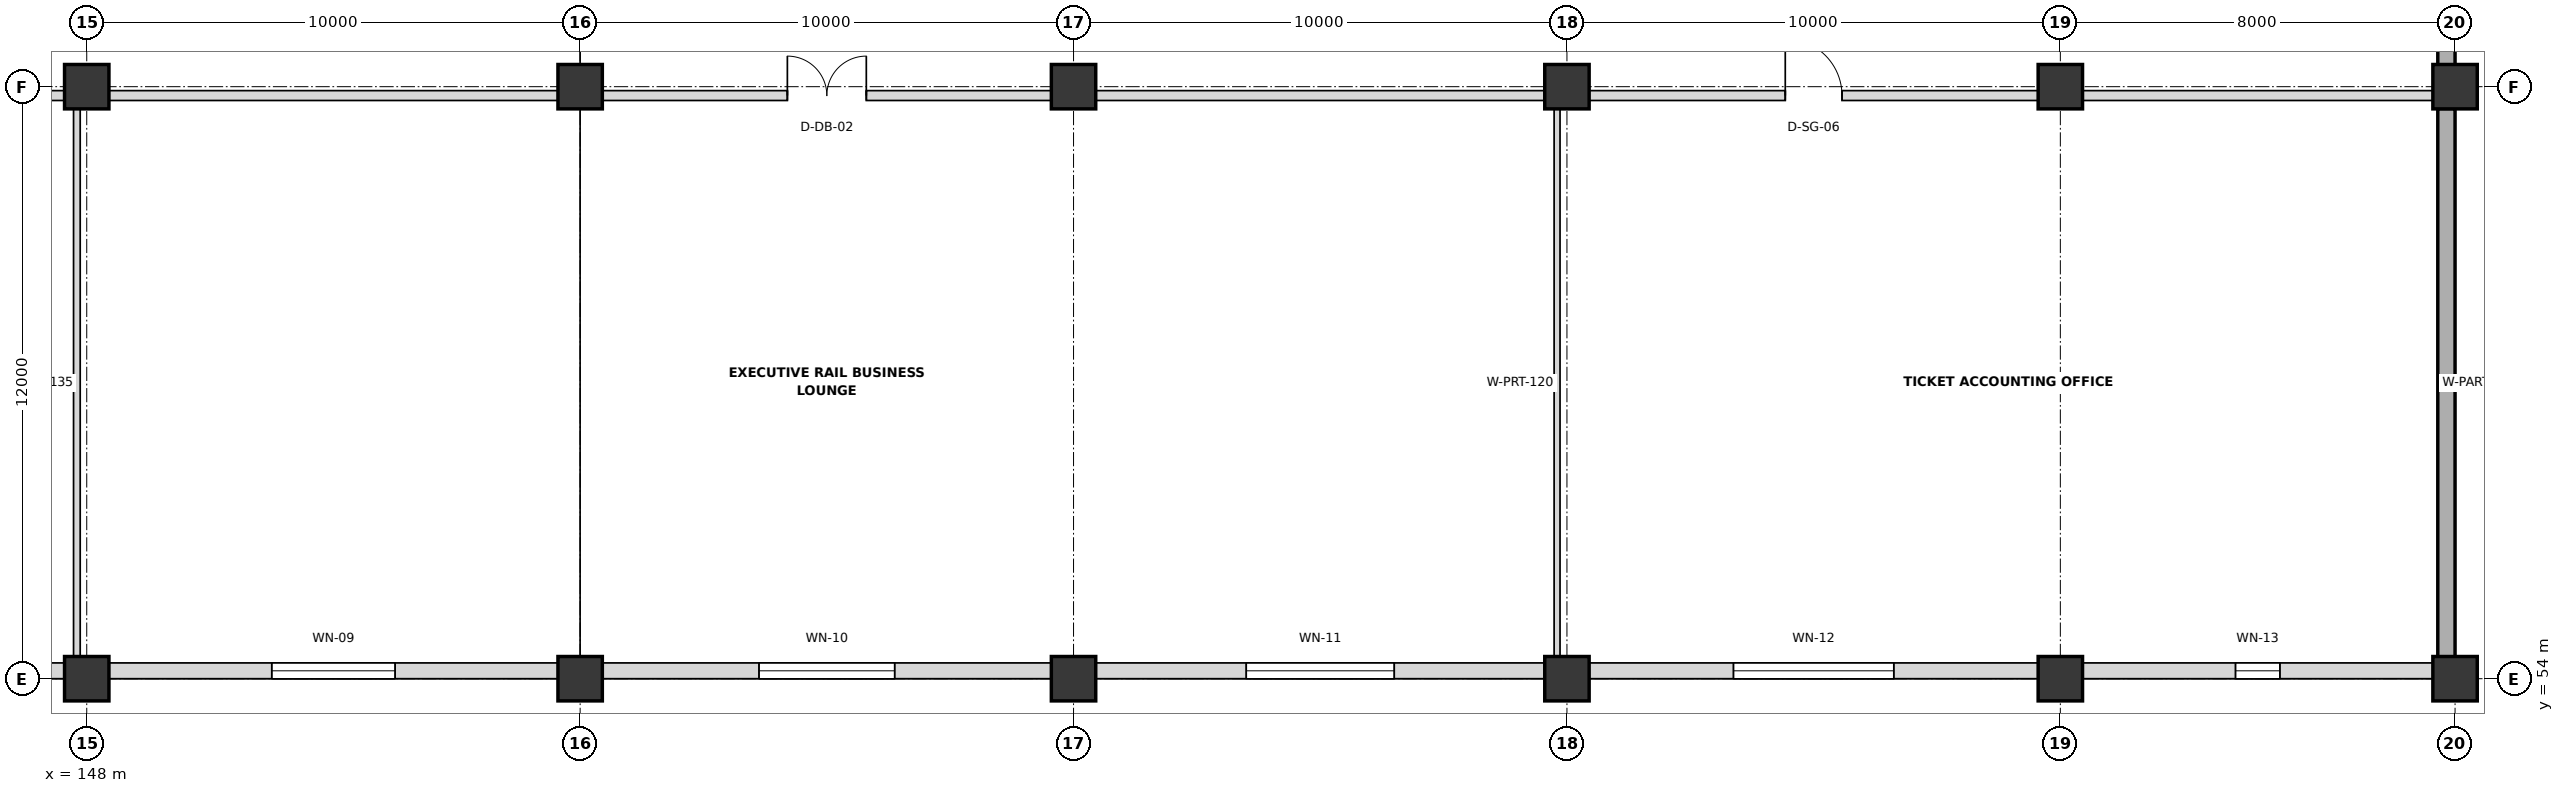
"""IFC4 building model, lengths in metres.
Left out: names, types, materials, properties, quantities, classifications, styles, units other than length and angle.
Written with IfcOpenShell. Run it as: python <this file> out.ifc"""

import sys

from ifc_helpers import new_model, si_unit, direction, frame, frame_2d, origin, origin_2d, place, context, subcontext, project, spatial, rectangle, extrude, element, fill, save


model = new_model("IFC4")
c1 = context("Model", 3, precision=1e-05, world=origin(), true_north=direction((0.0, 1.0)))
c2 = subcontext(c1, "Body", "Model", "MODEL_VIEW")
j1 = project(units=[si_unit("LENGTHUNIT", "METRE"), si_unit("PLANEANGLEUNIT", "RADIAN")], contexts=[c1])
p1 = place(None, origin())
s1 = spatial("IfcSite", under=j1, at=p1, CompositionType="ELEMENT")
p2 = place(p1, origin())
s2 = spatial("IfcBuilding", under=s1, at=p2, CompositionType="ELEMENT")
p3 = place(p2, frame((0.0, 0.0, 5.4)))
s3 = spatial("IfcBuildingStorey", under=s2, at=p3, CompositionType="ELEMENT", Elevation=5.4)
for number, where, z_axis, x_axis in (
    (1, (148.0, 54.0, 0.0), (0.0, 0.0, 1.0), (1.0, 0.0, 0.0)),
    (2, (148.0, 66.0, 0.0), (0.0, 0.0, 1.0), (1.0, 0.0, 0.0)),
    (3, (158.0, 54.0, 0.0), (0.0, 0.0, 1.0), (1.0, 0.0, 0.0)),
    (4, (158.0, 66.0, 0.0), (0.0, 0.0, 1.0), (1.0, 0.0, 0.0)),
    (5, (168.0, 54.0, 0.0), (0.0, 0.0, 1.0), (1.0, 0.0, 0.0)),
    (6, (168.0, 66.0, 0.0), (0.0, 0.0, 1.0), (1.0, 0.0, 0.0)),
    (7, (178.0, 54.0, 0.0), (0.0, 0.0, 1.0), (1.0, 0.0, 0.0)),
    (8, (178.0, 66.0, 0.0), (0.0, 0.0, 1.0), (1.0, 0.0, 0.0)),
    (9, (188.0, 54.0, 0.0), (0.0, 0.0, 1.0), (1.0, 0.0, 0.0)),
    (10, (188.0, 66.0, 0.0), (0.0, 0.0, 1.0), (1.0, 0.0, 0.0)),
    (11, (196.0, 54.0, 0.0), (0.0, 0.0, 1.0), (1.0, 0.0, 0.0)),
    (12, (196.0, 66.0, 0.0), (0.0, 0.0, 1.0), (1.0, 0.0, 0.0)),
):
    element("IfcColumn", number, at=place(p3, frame(where, z_axis=z_axis, x_axis=x_axis)), inside=s3, PredefinedType="COLUMN", context=c2, shape_type="SweptSolid", body=[
        extrude(rectangle(XDim=0.9, YDim=0.9, at=origin_2d()), origin(), (0.0, 0.0, 1.0), 4.2),
    ])
for number, where, z_axis, x_axis in (
    (13, (195.825, 65.555, 0.0), (0.0, 0.0, 1.0), (0.0, -1.0, 0.0)),
    (14, (195.825, 77.555, 0.0), (0.0, 0.0, 1.0), (0.0, -1.0, 0.0)),
):
    element("IfcWall", number, at=place(p3, frame(where, z_axis=z_axis, x_axis=x_axis)), inside=s3, PredefinedType="SOLIDWALL", context=c2, shape_type="SweptSolid", body=[
        extrude(rectangle(XDim=11.11, YDim=0.35, at=frame_2d((5.555, 0.0))), origin(), (0.0, 0.0, 1.0), 4.2),
    ])
p4 = place(p3, frame((147.555, 54.16, 0.0), z_axis=(0.0, 0.0, 1.0), x_axis=(-1.0, 0.0, 0.0)))
e15 = element("IfcWall", 15, at=p4, inside=s3, PredefinedType="SOLIDWALL", context=c2, shape_type="SweptSolid", body=[
    extrude(rectangle(XDim=9.11, YDim=0.32, at=frame_2d((4.555, 0.0))), origin(), (0.0, 0.0, 1.0), 3.118),
])
p5 = place(p4, frame((3.405, 0.0, 1.0)))
e16 = element("IfcOpeningElement", 16, at=p5, cuts=e15, PredefinedType="OPENING", context=c2, shape_type="SweptSolid", body=[
    extrude(rectangle(XDim=2.3, YDim=1.15, at=frame_2d((1.15, 0.575))), frame((0.0, 0.17, 0.0), z_axis=(0.0, -1.0, 0.0), x_axis=(1.0, 0.0, 0.0)), (0.0, 0.0, 1.0), 0.34),
])
p6 = place(p3, frame((157.555, 54.16, 0.0), z_axis=(0.0, 0.0, 1.0), x_axis=(-1.0, 0.0, 0.0)))
e17 = element("IfcWall", 17, at=p6, inside=s3, PredefinedType="SOLIDWALL", context=c2, shape_type="SweptSolid", body=[
    extrude(rectangle(XDim=9.11, YDim=0.32, at=frame_2d((4.555, 0.0))), origin(), (0.0, 0.0, 1.0), 3.118),
])
p7 = place(p6, frame((3.305, 0.0, 1.0)))
e18 = element("IfcOpeningElement", 18, at=p7, cuts=e17, PredefinedType="OPENING", context=c2, shape_type="SweptSolid", body=[
    extrude(rectangle(XDim=2.5, YDim=1.15, at=frame_2d((1.25, 0.575))), frame((0.0, 0.17, 0.0), z_axis=(0.0, -1.0, 0.0), x_axis=(1.0, 0.0, 0.0)), (0.0, 0.0, 1.0), 0.34),
])
p8 = place(p3, frame((167.555, 54.16, 0.0), z_axis=(0.0, 0.0, 1.0), x_axis=(-1.0, 0.0, 0.0)))
e19 = element("IfcWall", 19, at=p8, inside=s3, PredefinedType="SOLIDWALL", context=c2, shape_type="SweptSolid", body=[
    extrude(rectangle(XDim=9.11, YDim=0.32, at=frame_2d((4.555, 0.0))), origin(), (0.0, 0.0, 1.0), 3.118),
])
p9 = place(p8, frame((3.18, 0.0, 1.0)))
e20 = element("IfcOpeningElement", 20, at=p9, cuts=e19, PredefinedType="OPENING", context=c2, shape_type="SweptSolid", body=[
    extrude(rectangle(XDim=2.75, YDim=1.15, at=frame_2d((1.375, 0.575))), frame((0.0, 0.17, 0.0), z_axis=(0.0, -1.0, 0.0), x_axis=(1.0, 0.0, 0.0)), (0.0, 0.0, 1.0), 0.34),
])
p10 = place(p3, frame((177.555, 54.16, 0.0), z_axis=(0.0, 0.0, 1.0), x_axis=(-1.0, 0.0, 0.0)))
e21 = element("IfcWall", 21, at=p10, inside=s3, PredefinedType="SOLIDWALL", context=c2, shape_type="SweptSolid", body=[
    extrude(rectangle(XDim=9.11, YDim=0.32, at=frame_2d((4.555, 0.0))), origin(), (0.0, 0.0, 1.0), 3.118),
])
p11 = place(p10, frame((3.055, 0.0, 1.0)))
e22 = element("IfcOpeningElement", 22, at=p11, cuts=e21, PredefinedType="OPENING", context=c2, shape_type="SweptSolid", body=[
    extrude(rectangle(XDim=3.0, YDim=1.15, at=frame_2d((1.5, 0.575))), frame((0.0, 0.17, 0.0), z_axis=(0.0, -1.0, 0.0), x_axis=(1.0, 0.0, 0.0)), (0.0, 0.0, 1.0), 0.34),
])
p12 = place(p3, frame((187.555, 54.16, 0.0), z_axis=(0.0, 0.0, 1.0), x_axis=(-1.0, 0.0, 0.0)))
e23 = element("IfcWall", 23, at=p12, inside=s3, PredefinedType="SOLIDWALL", context=c2, shape_type="SweptSolid", body=[
    extrude(rectangle(XDim=9.11, YDim=0.32, at=frame_2d((4.555, 0.0))), origin(), (0.0, 0.0, 1.0), 3.118),
])
p13 = place(p12, frame((2.93, 0.0, 1.0)))
e24 = element("IfcOpeningElement", 24, at=p13, cuts=e23, PredefinedType="OPENING", context=c2, shape_type="SweptSolid", body=[
    extrude(rectangle(XDim=3.25, YDim=1.15, at=frame_2d((1.625, 0.575))), frame((0.0, 0.17, 0.0), z_axis=(0.0, -1.0, 0.0), x_axis=(1.0, 0.0, 0.0)), (0.0, 0.0, 1.0), 0.34),
])
p14 = place(p3, frame((195.555, 54.16, 0.0), z_axis=(0.0, 0.0, 1.0), x_axis=(-1.0, 0.0, 0.0)))
e25 = element("IfcWall", 25, at=p14, inside=s3, PredefinedType="SOLIDWALL", context=c2, shape_type="SweptSolid", body=[
    extrude(rectangle(XDim=7.11, YDim=0.32, at=frame_2d((3.555, 0.0))), origin(), (0.0, 0.0, 1.0), 3.118),
])
p15 = place(p14, frame((3.105, 0.0, 1.0)))
e26 = element("IfcOpeningElement", 26, at=p15, cuts=e25, PredefinedType="OPENING", context=c2, shape_type="SweptSolid", body=[
    extrude(rectangle(XDim=0.9, YDim=1.4, at=frame_2d((0.45, 0.7))), frame((0.0, 0.17, 0.0), z_axis=(0.0, -1.0, 0.0), x_axis=(1.0, 0.0, 0.0)), (0.0, 0.0, 1.0), 0.34),
])
p16 = place(p3, frame((128.3, 65.82, 0.0), z_axis=(0.0, 0.0, 1.0), x_axis=(1.0, 0.0, 0.0)))
e27 = element("IfcWall", 27, at=p16, inside=s3, PredefinedType="PARTITIONING", context=c2, shape_type="SweptSolid", body=[
    extrude(rectangle(XDim=19.4, YDim=0.2, at=frame_2d((9.7, 0.0))), origin(), (0.0, 0.0, 1.0), 3.018),
])
p17 = place(p16, frame((4.175, 0.0, 0.0)))
e28 = element("IfcOpeningElement", 28, at=p17, cuts=e27, PredefinedType="OPENING", context=c2, shape_type="SweptSolid", body=[
    extrude(rectangle(XDim=1.05, YDim=2.1, at=frame_2d((0.525, 1.05))), frame((0.0, 0.11, 0.0), z_axis=(0.0, -1.0, 0.0), x_axis=(1.0, 0.0, 0.0)), (0.0, 0.0, 1.0), 0.22),
])
p18 = place(p3, frame((147.8, 54.3, 0.0), z_axis=(0.0, 0.0, 1.0), x_axis=(0.0, 1.0, 0.0)))
e29 = element("IfcWall", 29, at=p18, inside=s3, PredefinedType="PARTITIONING", context=c2, shape_type="SweptSolid", body=[
    extrude(rectangle(XDim=11.4, YDim=0.135, at=frame_2d((5.7, 0.0))), origin(), (0.0, 0.0, 1.0), 3.018),
])
p19 = place(p3, frame((148.3, 65.82, 0.0), z_axis=(0.0, 0.0, 1.0), x_axis=(1.0, 0.0, 0.0)))
e30 = element("IfcWall", 30, at=p19, inside=s3, PredefinedType="PARTITIONING", context=c2, shape_type="SweptSolid", body=[
    extrude(rectangle(XDim=29.4, YDim=0.2, at=frame_2d((14.7, 0.0))), origin(), (0.0, 0.0, 1.0), 3.018),
])
p20 = place(p19, frame((13.9, 0.0, 0.0)))
e31 = element("IfcOpeningElement", 31, at=p20, cuts=e30, PredefinedType="OPENING", context=c2, shape_type="SweptSolid", body=[
    extrude(rectangle(XDim=1.6, YDim=2.15, at=frame_2d((0.8, 1.075))), frame((0.0, 0.11, 0.0), z_axis=(0.0, -1.0, 0.0), x_axis=(1.0, 0.0, 0.0)), (0.0, 0.0, 1.0), 0.22),
])
p21 = place(p3, frame((177.8, 54.3, 0.0), z_axis=(0.0, 0.0, 1.0), x_axis=(0.0, 1.0, 0.0)))
e32 = element("IfcWall", 32, at=p21, inside=s3, PredefinedType="PARTITIONING", context=c2, shape_type="SweptSolid", body=[
    extrude(rectangle(XDim=11.4, YDim=0.12, at=frame_2d((5.7, 0.0))), origin(), (0.0, 0.0, 1.0), 3.018),
])
p22 = place(p3, frame((178.3, 65.82, 0.0), z_axis=(0.0, 0.0, 1.0), x_axis=(1.0, 0.0, 0.0)))
e33 = element("IfcWall", 33, at=p22, inside=s3, PredefinedType="PARTITIONING", context=c2, shape_type="SweptSolid", body=[
    extrude(rectangle(XDim=17.3, YDim=0.2, at=frame_2d((8.65, 0.0))), origin(), (0.0, 0.0, 1.0), 3.018),
])
p23 = place(p22, frame((4.125, 0.0, 0.0)))
e34 = element("IfcOpeningElement", 34, at=p23, cuts=e33, PredefinedType="OPENING", context=c2, shape_type="SweptSolid", body=[
    extrude(rectangle(XDim=1.15, YDim=2.1, at=frame_2d((0.575, 1.05))), frame((0.0, 0.11, 0.0), z_axis=(0.0, -1.0, 0.0), x_axis=(1.0, 0.0, 0.0)), (0.0, 0.0, 1.0), 0.22),
])
p24 = place(p7, origin())
e35 = element("IfcWindow", 35, at=p24, inside=s3, PartitioningType="SINGLE_PANEL", PredefinedType="WINDOW", context=c2, shape_type="SweptSolid", body=[
    extrude(rectangle(XDim=2.5, YDim=1.15, at=frame_2d((1.25, 0.575))), frame((0.0, 0.03, 0.0), z_axis=(0.0, -1.0, 0.0), x_axis=(1.0, 0.0, 0.0)), (0.0, 0.0, 1.0), 0.06),
])
fill(e18, e35)
p25 = place(p9, origin())
e36 = element("IfcWindow", 36, at=p25, inside=s3, PartitioningType="SINGLE_PANEL", PredefinedType="WINDOW", context=c2, shape_type="SweptSolid", body=[
    extrude(rectangle(XDim=2.75, YDim=1.15, at=frame_2d((1.375, 0.575))), frame((0.0, 0.03, 0.0), z_axis=(0.0, -1.0, 0.0), x_axis=(1.0, 0.0, 0.0)), (0.0, 0.0, 1.0), 0.06),
])
fill(e20, e36)
p26 = place(p11, origin())
e37 = element("IfcWindow", 37, at=p26, inside=s3, PartitioningType="SINGLE_PANEL", PredefinedType="WINDOW", context=c2, shape_type="SweptSolid", body=[
    extrude(rectangle(XDim=3.0, YDim=1.15, at=frame_2d((1.5, 0.575))), frame((0.0, 0.03, 0.0), z_axis=(0.0, -1.0, 0.0), x_axis=(1.0, 0.0, 0.0)), (0.0, 0.0, 1.0), 0.06),
])
fill(e22, e37)
p27 = place(p13, origin())
e38 = element("IfcWindow", 38, at=p27, inside=s3, PartitioningType="SINGLE_PANEL", PredefinedType="WINDOW", context=c2, shape_type="SweptSolid", body=[
    extrude(rectangle(XDim=3.25, YDim=1.15, at=frame_2d((1.625, 0.575))), frame((0.0, 0.03, 0.0), z_axis=(0.0, -1.0, 0.0), x_axis=(1.0, 0.0, 0.0)), (0.0, 0.0, 1.0), 0.06),
])
fill(e24, e38)
p28 = place(p15, origin())
e39 = element("IfcWindow", 39, at=p28, inside=s3, PartitioningType="SINGLE_PANEL", PredefinedType="WINDOW", context=c2, shape_type="SweptSolid", body=[
    extrude(rectangle(XDim=0.9, YDim=1.4, at=frame_2d((0.45, 0.7))), frame((0.0, 0.03, 0.0), z_axis=(0.0, -1.0, 0.0), x_axis=(1.0, 0.0, 0.0)), (0.0, 0.0, 1.0), 0.06),
])
fill(e26, e39)
p29 = place(p20, origin())
e40 = element("IfcDoor", 40, at=p29, inside=s3, OperationType="DOUBLE_DOOR_SINGLE_SWING", PredefinedType="DOOR", context=c2, shape_type="SweptSolid", body=[
    extrude(rectangle(XDim=1.6, YDim=2.15, at=frame_2d((0.8, 1.075))), frame((0.0, 0.025, 0.0), z_axis=(0.0, -1.0, 0.0), x_axis=(1.0, 0.0, 0.0)), (0.0, 0.0, 1.0), 0.05),
])
fill(e31, e40)
p30 = place(p23, origin())
e41 = element("IfcDoor", 41, at=p30, inside=s3, OperationType="SINGLE_SWING_LEFT", PredefinedType="DOOR", context=c2, shape_type="SweptSolid", body=[
    extrude(rectangle(XDim=1.15, YDim=2.1, at=frame_2d((0.575, 1.05))), frame((0.0, 0.025, 0.0), z_axis=(0.0, -1.0, 0.0), x_axis=(1.0, 0.0, 0.0)), (0.0, 0.0, 1.0), 0.05),
])
fill(e34, e41)
save(model, sys.argv[1])
